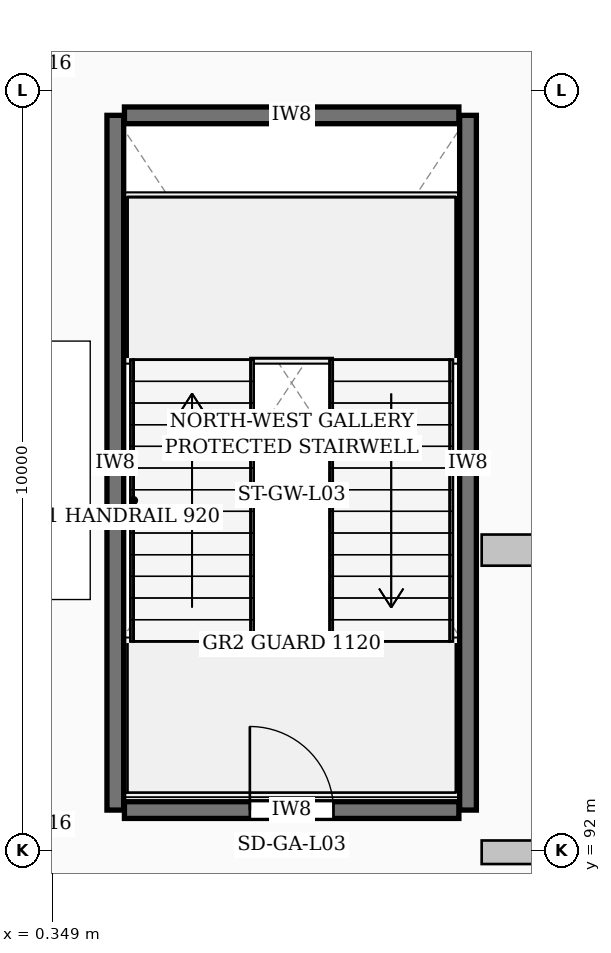
"""IFC4 building model, lengths in metres.
Left out: names, types, materials, properties, quantities, classifications, styles, units other than length and angle.
Written with IfcOpenShell. Run it as: python <this file> out.ifc"""

import sys

from ifc_helpers import new_model, si_unit, direction, frame, frame_2d, origin, place, context, subcontext, project, spatial, rectangle, extrude, element, fill, save


model = new_model("IFC4")
c1 = context("Model", 3, precision=1e-05, world=origin(), true_north=direction((0.0, 1.0)))
c2 = subcontext(c1, "Body", "Model", "MODEL_VIEW")
j1 = project(units=[si_unit("LENGTHUNIT", "METRE"), si_unit("PLANEANGLEUNIT", "RADIAN")], contexts=[c1])
p1 = place(None, origin())
s1 = spatial("IfcSite", under=j1, at=p1, CompositionType="ELEMENT")
p2 = place(p1, origin())
s2 = spatial("IfcBuilding", under=s1, at=p2, CompositionType="ELEMENT")
p3 = place(p2, frame((0.0, 0.0, 14.4)))
s3 = spatial("IfcBuildingStorey", under=s2, at=p3, CompositionType="ELEMENT", Elevation=14.4)
for number, where, z_axis, x_axis in (
    (1, (1.18, 92.53, 0.0), (0.0, 0.0, 1.0), (0.0, 1.0, 0.0)),
    (2, (5.82, 92.53, 0.0), (0.0, 0.0, 1.0), (0.0, 1.0, 0.0)),
):
    element("IfcWall", number, at=place(p3, frame(where, z_axis=z_axis, x_axis=x_axis)), inside=s3, PredefinedType="SHEAR", context=c2, shape_type="SweptSolid", body=[
        extrude(rectangle(XDim=9.14, YDim=0.22, at=frame_2d((4.57, 0.0))), origin(), (0.0, 0.0, 1.0), 9.36),
    ])
p4 = place(p3, frame((1.3, 101.67, 0.0), z_axis=(0.0, 0.0, 1.0), x_axis=(1.0, 0.0, 0.0)))
e3 = element("IfcWall", 3, at=p4, inside=s3, PredefinedType="SHEAR", context=c2, shape_type="SweptSolid", body=[
    extrude(rectangle(XDim=4.4, YDim=0.22, at=frame_2d((2.2, 0.0))), origin(), (0.0, 0.0, 1.0), 9.36),
])
p5 = place(p3, frame((1.3, 92.53, 0.0), z_axis=(0.0, 0.0, 1.0), x_axis=(1.0, 0.0, 0.0)))
e4 = element("IfcWall", 4, at=p5, inside=s3, PredefinedType="SHEAR", context=c2, shape_type="SweptSolid", body=[
    extrude(rectangle(XDim=4.4, YDim=0.22, at=frame_2d((2.2, 0.0))), origin(), (0.0, 0.0, 1.0), 9.36),
])
p6 = place(p5, frame((1.65, 0.0, 0.0)))
e5 = element("IfcOpeningElement", 5, at=p6, cuts=e4, PredefinedType="OPENING", context=c2, shape_type="SweptSolid", body=[
    extrude(rectangle(XDim=1.1, YDim=2.2, at=frame_2d((0.55, 1.1))), frame((0.0, 0.12, 0.0), z_axis=(0.0, -1.0, 0.0), x_axis=(1.0, 0.0, 0.0)), (0.0, 0.0, 1.0), 0.24),
])
p7 = place(p3, frame((6.0, 91.975, 0.0), z_axis=(0.0, 0.0, 1.0), x_axis=(1.0, 0.0, 0.0)))
e6 = element("IfcWall", 6, at=p7, inside=s3, PredefinedType="PARTITIONING", context=c2, shape_type="SweptSolid", body=[
    extrude(rectangle(XDim=4.62, YDim=0.31, at=frame_2d((2.31, 0.0))), origin(), (0.0, 0.0, 1.0), 8.92),
])
p8 = place(p7, frame((1.78, 0.0, 0.0)))
e7 = element("IfcOpeningElement", 7, at=p8, cuts=e6, PredefinedType="OPENING", context=c2, shape_type="SweptSolid", body=[
    extrude(rectangle(XDim=1.06, YDim=2.22, at=frame_2d((0.53, 1.11))), frame((0.0, 0.165, 0.0), z_axis=(0.0, -1.0, 0.0), x_axis=(1.0, 0.0, 0.0)), (0.0, 0.0, 1.0), 0.33),
])
p9 = place(p3, frame((6.0, 95.95, 0.0), z_axis=(0.0, 0.0, 1.0), x_axis=(1.0, 0.0, 0.0)))
e8 = element("IfcWall", 8, at=p9, inside=s3, PredefinedType="PARTITIONING", context=c2, shape_type="SweptSolid", body=[
    extrude(rectangle(XDim=15.42, YDim=0.41, at=frame_2d((7.71, 0.0))), origin(), (0.0, 0.0, 1.0), 9.32),
])
p10 = place(p9, frame((7.02, 0.0, 0.0)))
e9 = element("IfcOpeningElement", 9, at=p10, cuts=e8, PredefinedType="OPENING", context=c2, shape_type="SweptSolid", body=[
    extrude(rectangle(XDim=1.38, YDim=2.38, at=frame_2d((0.69, 1.19))), frame((0.0, 0.215, 0.0), z_axis=(0.0, -1.0, 0.0), x_axis=(1.0, 0.0, 0.0)), (0.0, 0.0, 1.0), 0.43),
])
p11 = place(p6, origin())
e10 = element("IfcDoor", 10, at=p11, inside=s3, OperationType="SINGLE_SWING_LEFT", PredefinedType="DOOR", context=c2, shape_type="SweptSolid", body=[
    extrude(rectangle(XDim=1.1, YDim=2.2, at=frame_2d((0.55, 1.1))), frame((0.0, 0.025, 0.0), z_axis=(0.0, -1.0, 0.0), x_axis=(1.0, 0.0, 0.0)), (0.0, 0.0, 1.0), 0.05),
])
fill(e5, e10)
save(model, sys.argv[1])
